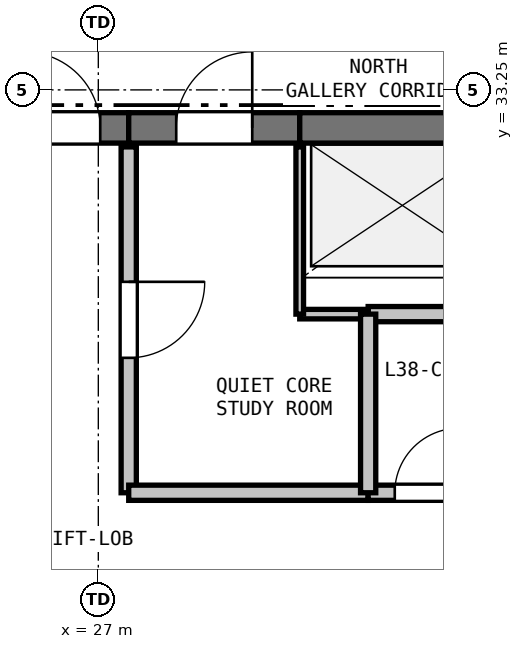
"""IFC4 building model, lengths in metres.
Left out: names, types, materials, properties, quantities, classifications, styles, units other than length and angle.
Written with IfcOpenShell. Run it as: python <this file> out.ifc"""

import sys

from ifc_helpers import new_model, si_unit, direction, frame, frame_2d, origin, place, context, subcontext, project, spatial, rectangle, extrude, element, fill, save


model = new_model("IFC4")
c1 = context("Model", 3, precision=1e-05, world=origin(), true_north=direction((0.0, 1.0)))
c2 = subcontext(c1, "Body", "Model", "MODEL_VIEW")
j1 = project(units=[si_unit("LENGTHUNIT", "METRE"), si_unit("PLANEANGLEUNIT", "RADIAN")], contexts=[c1])
p1 = place(None, origin())
s1 = spatial("IfcSite", under=j1, at=p1, CompositionType="ELEMENT")
p2 = place(p1, origin())
s2 = spatial("IfcBuilding", under=s1, at=p2, CompositionType="ELEMENT")
p3 = place(p2, frame((0.0, 0.0, 137.7)))
s3 = spatial("IfcBuildingStorey", under=s2, at=p3, CompositionType="ELEMENT", Elevation=137.7)
p4 = place(p3, frame((25.65, 32.75, 0.0), z_axis=(0.0, 0.0, 1.0), x_axis=(1.0, 0.0, 0.0)))
e1 = element("IfcWall", 1, at=p4, inside=s3, PredefinedType="SHEAR", context=c2, shape_type="SweptSolid", body=[
    extrude(rectangle(XDim=1.75, YDim=0.4, at=frame_2d((0.875, 0.0))), origin(), (0.0, 0.0, 1.0), 3.06),
])
p5 = place(p4, frame((0.375, 0.0, 0.0)))
e2 = element("IfcOpeningElement", 2, at=p5, cuts=e1, PredefinedType="OPENING", context=c2, shape_type="SweptSolid", body=[
    extrude(rectangle(XDim=1.0, YDim=2.15, at=frame_2d((0.5, 1.075))), frame((0.0, 0.21, 0.0), z_axis=(0.0, -1.0, 0.0), x_axis=(1.0, 0.0, 0.0)), (0.0, 0.0, 1.0), 0.42),
])
p6 = place(p3, frame((27.4, 32.75, 0.0), z_axis=(0.0, 0.0, 1.0), x_axis=(1.0, 0.0, 0.0)))
e3 = element("IfcWall", 3, at=p6, inside=s3, PredefinedType="SHEAR", context=c2, shape_type="SweptSolid", body=[
    extrude(rectangle(XDim=2.25, YDim=0.4, at=frame_2d((1.125, 0.0))), origin(), (0.0, 0.0, 1.0), 3.06),
])
p7 = place(p6, frame((0.625, 0.0, 0.0)))
e4 = element("IfcOpeningElement", 4, at=p7, cuts=e3, PredefinedType="OPENING", context=c2, shape_type="SweptSolid", body=[
    extrude(rectangle(XDim=1.0, YDim=2.15, at=frame_2d((0.5, 1.075))), frame((0.0, 0.21, 0.0), z_axis=(0.0, -1.0, 0.0), x_axis=(1.0, 0.0, 0.0)), (0.0, 0.0, 1.0), 0.42),
])
p8 = place(p3, frame((29.65, 32.75, 0.0), z_axis=(0.0, 0.0, 1.0), x_axis=(1.0, 0.0, 0.0)))
e5 = element("IfcWall", 5, at=p8, inside=s3, PredefinedType="SHEAR", context=c2, shape_type="SweptSolid", body=[
    extrude(rectangle(XDim=2.7, YDim=0.4, at=frame_2d((1.35, 0.0))), origin(), (0.0, 0.0, 1.0), 3.06),
])
p9 = place(p3, frame((32.1, 30.3, 0.0), z_axis=(0.0, 0.0, 1.0), x_axis=(-1.0, 0.0, 0.0)))
e6 = element("IfcWall", 6, at=p9, inside=s3, PredefinedType="PARTITIONING", context=c2, shape_type="SweptSolid", body=[
    extrude(rectangle(XDim=1.55, YDim=0.2, at=frame_2d((0.775, 0.0))), origin(), (0.0, 0.0, 1.0), 3.06),
])
p10 = place(p3, frame((30.55, 30.3, 0.0), z_axis=(0.0, 0.0, 1.0), x_axis=(-1.0, 0.0, 0.0)))
e7 = element("IfcWall", 7, at=p10, inside=s3, PredefinedType="PARTITIONING", context=c2, shape_type="SweptSolid", body=[
    extrude(rectangle(XDim=0.9, YDim=0.125, at=frame_2d((0.45, 0.0))), origin(), (0.0, 0.0, 1.0), 3.06),
])
p11 = place(p3, frame((29.65, 30.3, 0.0), z_axis=(0.0, 0.0, 1.0), x_axis=(0.0, 1.0, 0.0)))
e8 = element("IfcWall", 8, at=p11, inside=s3, PredefinedType="PARTITIONING", context=c2, shape_type="SweptSolid", body=[
    extrude(rectangle(XDim=2.2, YDim=0.1, at=frame_2d((1.1, 0.0))), origin(), (0.0, 0.0, 1.0), 3.06),
])
p12 = place(p3, frame((27.4, 32.5, 0.0), z_axis=(0.0, 0.0, 1.0), x_axis=(0.0, -1.0, 0.0)))
e9 = element("IfcWall", 9, at=p12, inside=s3, PredefinedType="PARTITIONING", context=c2, shape_type="SweptSolid", body=[
    extrude(rectangle(XDim=4.55, YDim=0.2, at=frame_2d((2.275, 0.0))), origin(), (0.0, 0.0, 1.0), 3.06),
])
p13 = place(p12, frame((1.775, 0.0, 0.0)))
e10 = element("IfcOpeningElement", 10, at=p13, cuts=e9, PredefinedType="OPENING", context=c2, shape_type="SweptSolid", body=[
    extrude(rectangle(XDim=1.0, YDim=2.15, at=frame_2d((0.5, 1.075))), frame((0.0, 0.11, 0.0), z_axis=(0.0, -1.0, 0.0), x_axis=(1.0, 0.0, 0.0)), (0.0, 0.0, 1.0), 0.22),
])
p14 = place(p3, frame((27.4, 27.95, 0.0), z_axis=(0.0, 0.0, 1.0), x_axis=(1.0, 0.0, 0.0)))
e11 = element("IfcWall", 11, at=p14, inside=s3, PredefinedType="PARTITIONING", context=c2, shape_type="SweptSolid", body=[
    extrude(rectangle(XDim=3.15, YDim=0.2, at=frame_2d((1.575, 0.0))), origin(), (0.0, 0.0, 1.0), 3.06),
])
p15 = place(p3, frame((30.55, 27.95, 0.0), z_axis=(0.0, 0.0, 1.0), x_axis=(1.0, 0.0, 0.0)))
e12 = element("IfcWall", 12, at=p15, inside=s3, PredefinedType="PARTITIONING", context=c2, shape_type="SweptSolid", body=[
    extrude(rectangle(XDim=1.55, YDim=0.2, at=frame_2d((0.775, 0.0))), origin(), (0.0, 0.0, 1.0), 3.06),
])
p16 = place(p15, frame((0.35, 0.0, 0.0)))
e13 = element("IfcOpeningElement", 13, at=p16, cuts=e12, PredefinedType="OPENING", context=c2, shape_type="SweptSolid", body=[
    extrude(rectangle(XDim=0.85, YDim=2.1, at=frame_2d((0.425, 1.05))), frame((0.0, 0.11, 0.0), z_axis=(0.0, -1.0, 0.0), x_axis=(1.0, 0.0, 0.0)), (0.0, 0.0, 1.0), 0.22),
])
p17 = place(p3, frame((30.55, 30.3, 0.0), z_axis=(0.0, 0.0, 1.0), x_axis=(0.0, -1.0, 0.0)))
e14 = element("IfcWall", 14, at=p17, inside=s3, PredefinedType="PARTITIONING", context=c2, shape_type="SweptSolid", body=[
    extrude(rectangle(XDim=2.35, YDim=0.2, at=frame_2d((1.175, 0.0))), origin(), (0.0, 0.0, 1.0), 3.06),
])
p18 = place(p5, origin())
e15 = element("IfcDoor", 15, at=p18, inside=s3, OperationType="SINGLE_SWING_LEFT", PredefinedType="DOOR", context=c2, shape_type="SweptSolid", body=[
    extrude(rectangle(XDim=1.0, YDim=2.15, at=frame_2d((0.5, 1.075))), frame((0.0, 0.025, 0.0), z_axis=(0.0, -1.0, 0.0), x_axis=(1.0, 0.0, 0.0)), (0.0, 0.0, 1.0), 0.05),
])
fill(e2, e15)
p19 = place(p13, origin())
e16 = element("IfcDoor", 16, at=p19, inside=s3, OperationType="SINGLE_SWING_LEFT", PredefinedType="DOOR", context=c2, shape_type="SweptSolid", body=[
    extrude(rectangle(XDim=1.0, YDim=2.15, at=frame_2d((0.5, 1.075))), frame((0.0, 0.025, 0.0), z_axis=(0.0, -1.0, 0.0), x_axis=(1.0, 0.0, 0.0)), (0.0, 0.0, 1.0), 0.05),
])
fill(e10, e16)
p20 = place(p16, origin())
e17 = element("IfcDoor", 17, at=p20, inside=s3, OperationType="SINGLE_SWING_RIGHT", PredefinedType="DOOR", context=c2, shape_type="SweptSolid", body=[
    extrude(rectangle(XDim=0.85, YDim=2.1, at=frame_2d((0.425, 1.05))), frame((0.0, 0.025, 0.0), z_axis=(0.0, -1.0, 0.0), x_axis=(1.0, 0.0, 0.0)), (0.0, 0.0, 1.0), 0.05),
])
fill(e13, e17)
p21 = place(p7, origin())
e18 = element("IfcDoor", 18, at=p21, inside=s3, OperationType="SINGLE_SWING_RIGHT", PredefinedType="DOOR", context=c2, shape_type="SweptSolid", body=[
    extrude(rectangle(XDim=1.0, YDim=2.15, at=frame_2d((0.5, 1.075))), frame((0.0, 0.025, 0.0), z_axis=(0.0, -1.0, 0.0), x_axis=(1.0, 0.0, 0.0)), (0.0, 0.0, 1.0), 0.05),
])
fill(e4, e18)
save(model, sys.argv[1])
